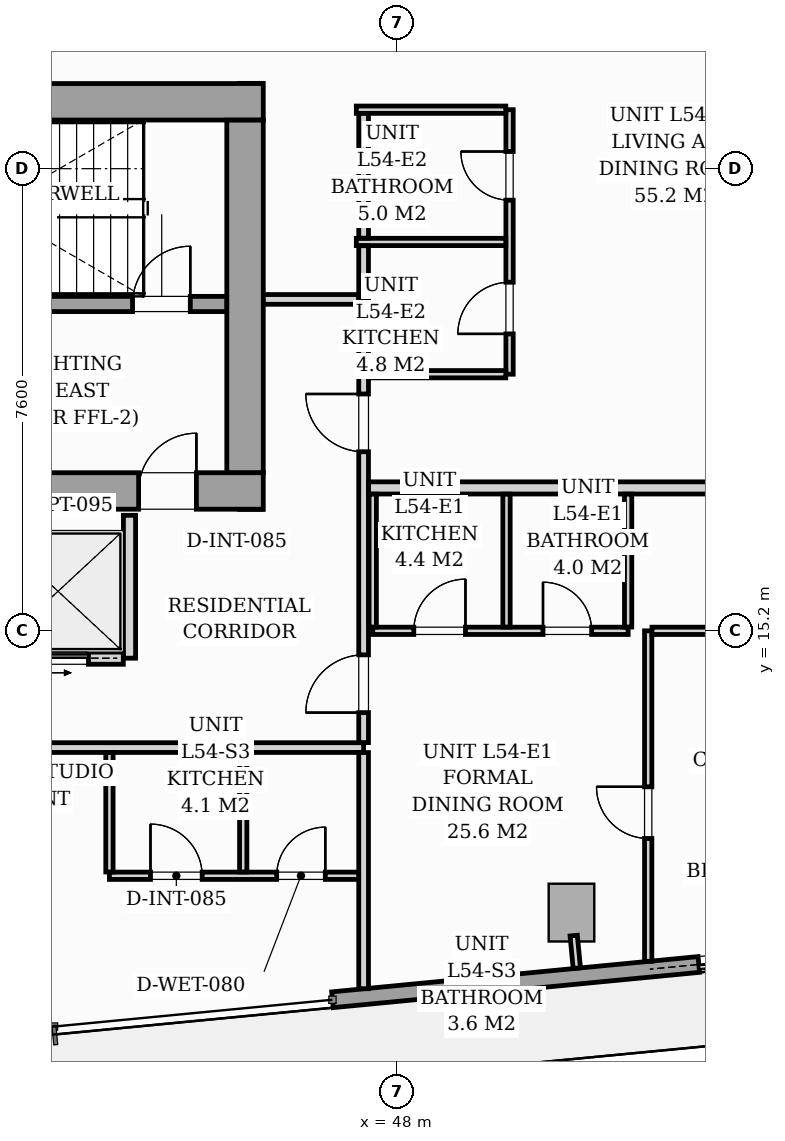
"""IFC4 building model, lengths in metres.
Left out: names, types, materials, properties, quantities, classifications, styles, units other than length and angle.
Written with IfcOpenShell. Run it as: python <this file> out.ifc"""

import sys

from ifc_helpers import new_model, si_unit, direction, frame, frame_2d, origin, origin_2d, place, context, subcontext, project, spatial, rectangle, i_section, extrude, source, transform, mapped, element, fill, save


model = new_model("IFC4")
c1 = context("Model", 3, precision=1e-05, world=origin(), true_north=direction((0.0, 1.0)))
c2 = subcontext(c1, "Body", "Model", "MODEL_VIEW")
j1 = project(units=[si_unit("LENGTHUNIT", "METRE"), si_unit("PLANEANGLEUNIT", "RADIAN")], contexts=[c1])
p1 = place(None, origin())
s1 = spatial("IfcSite", under=j1, at=p1, CompositionType="ELEMENT")
p2 = place(p1, origin())
s2 = spatial("IfcBuilding", under=s1, at=p2, CompositionType="ELEMENT")
p3 = place(p2, frame((0.0, 0.0, 189.0)))
s3 = spatial("IfcBuildingStorey", under=s2, at=p3, CompositionType="ELEMENT", Elevation=189.0)
m1 = source(origin(), c2, "Body", "SweptSolid", [
    extrude(i_section(OverallWidth=0.416, OverallDepth=0.446, WebThickness=0.039, FlangeThickness=0.063, FilletRadius=0.018, at=origin_2d()), origin(), (0.0, 0.0, 1.0), 3.196),
])
for number, where, z_axis, x_axis in (
    (1, (45.6, 17.4, 0.002), (0.0, 0.0, 1.0), (1.0, 0.0, 0.0)),
    (2, (45.6, 24.0, 0.002), (0.0, 0.0, 1.0), (1.0, 0.0, 0.0)),
):
    element("IfcColumn", number, at=place(p3, frame(where, z_axis=z_axis, x_axis=x_axis)), inside=s3, PredefinedType="PILASTER", context=c2, shape_type="MappedRepresentation", body=[
        mapped(m1, transform((0.0, 0.0, 0.0), scale=1.0)),
    ])
m2 = source(origin(), c2, "Body", "SweptSolid", [
    extrude(rectangle(XDim=0.75, YDim=0.95, at=origin_2d()), origin(), (0.0, 0.0, 1.0), 3.196),
])
p4 = place(p3, frame((50.868, 10.566, 0.002), z_axis=(0.0, 0.0, 1.0), x_axis=(0.995396198367, 0.09584575252, 0.0)))
e3 = element("IfcColumn", 3, at=p4, inside=s3, PredefinedType="COLUMN", context=c2, shape_type="MappedRepresentation", body=[
    mapped(m2, transform((0.0, 0.0, 0.0), scale=1.0)),
])
p5 = place(p3, frame((62.963, 10.676, 0.0), z_axis=(0.0, 0.0, 1.0), x_axis=(-0.995395627913, -0.095851676732, 0.0)))
e4 = element("IfcWall", 4, at=p5, inside=s3, PredefinedType="STANDARD", context=c2, shape_type="SweptSolid", body=[
    extrude(rectangle(XDim=16.1, YDim=0.26, at=frame_2d((8.05, 0.0))), origin(), (0.0, 0.0, 1.0), 2.94),
])
p6 = place(p5, frame((8.247, 0.0, 0.0)))
e5 = element("IfcOpeningElement", 5, at=p6, cuts=e4, PredefinedType="OPENING", context=c2, shape_type="SweptSolid", body=[
    extrude(rectangle(XDim=1.8, YDim=2.06, at=frame_2d((0.9, 1.03))), frame((0.0, 0.14, 0.0), z_axis=(0.0, -1.0, 0.0), x_axis=(1.0, 0.0, 0.0)), (0.0, 0.0, 1.0), 0.28),
])
p7 = place(p5, frame((2.05, 0.0, 0.65)))
e6 = element("IfcOpeningElement", 6, at=p7, cuts=e4, PredefinedType="OPENING", context=c2, shape_type="SweptSolid", body=[
    extrude(rectangle(XDim=1.6, YDim=1.5, at=frame_2d((0.8, 0.75))), frame((0.0, 0.14, 0.0), z_axis=(0.0, -1.0, 0.0), x_axis=(1.0, 0.0, 0.0)), (0.0, 0.0, 1.0), 0.28),
])
p8 = place(p3, frame((26.2, 17.5, 0.0), z_axis=(0.0, 0.0, 1.0), x_axis=(1.0, 0.0, 0.0)))
e7 = element("IfcWall", 7, at=p8, inside=s3, PredefinedType="SHEAR", context=c2, shape_type="SweptSolid", body=[
    extrude(rectangle(XDim=19.6, YDim=0.6, at=frame_2d((9.8, 0.0))), origin(), (0.0, 0.0, 1.0), 3.2),
])
p9 = place(p8, frame((0.95, 0.0, 0.0)))
e8 = element("IfcOpeningElement", 8, at=p9, cuts=e7, PredefinedType="OPENING", context=c2, shape_type="SweptSolid", body=[
    extrude(rectangle(XDim=0.95, YDim=2.06, at=frame_2d((0.475, 1.03))), frame((0.0, 0.31, 0.0), z_axis=(0.0, -1.0, 0.0), x_axis=(1.0, 0.0, 0.0)), (0.0, 0.0, 1.0), 0.62),
])
p10 = place(p8, frame((9.38, 0.0, 0.0)))
e9 = element("IfcOpeningElement", 9, at=p10, cuts=e7, PredefinedType="OPENING", context=c2, shape_type="SweptSolid", body=[
    extrude(rectangle(XDim=0.85, YDim=2.0, at=frame_2d((0.425, 1.0))), frame((0.0, 0.31, 0.0), z_axis=(0.0, -1.0, 0.0), x_axis=(1.0, 0.0, 0.0)), (0.0, 0.0, 1.0), 0.62),
])
p11 = place(p8, frame((17.55, 0.0, 0.0)))
e10 = element("IfcOpeningElement", 10, at=p11, cuts=e7, PredefinedType="OPENING", context=c2, shape_type="SweptSolid", body=[
    extrude(rectangle(XDim=0.95, YDim=2.06, at=frame_2d((0.475, 1.03))), frame((0.0, 0.31, 0.0), z_axis=(0.0, -1.0, 0.0), x_axis=(1.0, 0.0, 0.0)), (0.0, 0.0, 1.0), 0.62),
])
p12 = place(p3, frame((26.2, 23.9, 0.0), z_axis=(0.0, 0.0, 1.0), x_axis=(1.0, 0.0, 0.0)))
e11 = element("IfcWall", 11, at=p12, inside=s3, PredefinedType="SHEAR", context=c2, shape_type="SweptSolid", body=[
    extrude(rectangle(XDim=19.6, YDim=0.6, at=frame_2d((9.8, 0.0))), origin(), (0.0, 0.0, 1.0), 3.2),
])
p13 = place(p3, frame((45.5, 17.802, 0.0), z_axis=(0.0, 0.0, 1.0), x_axis=(0.0, 1.0, 0.0)))
e12 = element("IfcWall", 12, at=p13, inside=s3, PredefinedType="SHEAR", context=c2, shape_type="SweptSolid", body=[
    extrude(rectangle(XDim=5.796, YDim=0.6, at=frame_2d((2.898, 0.0))), origin(), (0.0, 0.0, 1.0), 3.2),
])
p14 = place(p3, frame((37.05, 20.575, 0.0), z_axis=(0.0, 0.0, 1.0), x_axis=(1.0, 0.0, 0.0)))
e13 = element("IfcWall", 13, at=p14, inside=s3, PredefinedType="SOLIDWALL", context=c2, shape_type="SweptSolid", body=[
    extrude(rectangle(XDim=8.148, YDim=0.25, at=frame_2d((4.074, 0.0))), origin(), (0.0, 0.0, 1.0), 3.2),
])
p15 = place(p14, frame((6.6, 0.0, 0.0)))
e14 = element("IfcOpeningElement", 14, at=p15, cuts=e13, PredefinedType="OPENING", context=c2, shape_type="SweptSolid", body=[
    extrude(rectangle(XDim=0.95, YDim=2.06, at=frame_2d((0.475, 1.03))), frame((0.0, 0.135, 0.0), z_axis=(0.0, -1.0, 0.0), x_axis=(1.0, 0.0, 0.0)), (0.0, 0.0, 1.0), 0.27),
])
p16 = place(p3, frame((43.6, 14.75, 0.0), z_axis=(0.0, 0.0, 1.0), x_axis=(0.0, 1.0, 0.0)))
e15 = element("IfcWall", 15, at=p16, inside=s3, PredefinedType="PARTITIONING", context=c2, shape_type="SweptSolid", body=[
    extrude(rectangle(XDim=2.35, YDim=0.2, at=frame_2d((1.175, 0.0))), origin(), (0.0, 0.0, 1.0), 2.94),
])
p17 = place(p3, frame((41.352, 14.75, 0.0), z_axis=(0.0, 0.0, 1.0), x_axis=(1.0, 0.0, 0.0)))
e16 = element("IfcWall", 16, at=p17, inside=s3, PredefinedType="PARTITIONING", context=c2, shape_type="SweptSolid", body=[
    extrude(rectangle(XDim=2.146, YDim=0.2, at=frame_2d((1.073, 0.0))), origin(), (0.0, 0.0, 1.0), 2.94),
])
p18 = place(p17, frame((0.523, 0.0, 0.0)))
e17 = element("IfcOpeningElement", 17, at=p18, cuts=e16, PredefinedType="OPENING", context=c2, shape_type="SweptSolid", body=[
    extrude(rectangle(XDim=1.05, YDim=2.08, at=frame_2d((0.525, 1.04))), frame((0.0, 0.11, 0.0), z_axis=(0.0, -1.0, 0.0), x_axis=(1.0, 0.0, 0.0)), (0.0, 0.0, 1.0), 0.22),
])
p19 = place(p3, frame((26.12, 13.28, 0.0), z_axis=(0.0, 0.0, 1.0), x_axis=(1.0, 0.0, 0.0)))
e18 = element("IfcWall", 18, at=p19, inside=s3, PredefinedType="PARTITIONING", context=c2, shape_type="SweptSolid", body=[
    extrude(rectangle(XDim=21.33, YDim=0.16, at=frame_2d((10.665, 0.0))), origin(), (0.0, 0.0, 1.0), 2.94),
])
p20 = place(p19, frame((4.704, 0.0, 0.0)))
e19 = element("IfcOpeningElement", 19, at=p20, cuts=e18, PredefinedType="OPENING", context=c2, shape_type="SweptSolid", body=[
    extrude(rectangle(XDim=0.95, YDim=2.06, at=frame_2d((0.475, 1.03))), frame((0.0, 0.09, 0.0), z_axis=(0.0, -1.0, 0.0), x_axis=(1.0, 0.0, 0.0)), (0.0, 0.0, 1.0), 0.18),
])
p21 = place(p19, frame((11.6, 0.0, 0.0)))
e20 = element("IfcOpeningElement", 20, at=p21, cuts=e18, PredefinedType="OPENING", context=c2, shape_type="SweptSolid", body=[
    extrude(rectangle(XDim=0.95, YDim=2.06, at=frame_2d((0.475, 1.03))), frame((0.0, 0.09, 0.0), z_axis=(0.0, -1.0, 0.0), x_axis=(1.0, 0.0, 0.0)), (0.0, 0.0, 1.0), 0.18),
])
p22 = place(p19, frame((14.976, 0.0, 0.0)))
e21 = element("IfcOpeningElement", 21, at=p22, cuts=e18, PredefinedType="OPENING", context=c2, shape_type="SweptSolid", body=[
    extrude(rectangle(XDim=0.95, YDim=2.06, at=frame_2d((0.475, 1.03))), frame((0.0, 0.09, 0.0), z_axis=(0.0, -1.0, 0.0), x_axis=(1.0, 0.0, 0.0)), (0.0, 0.0, 1.0), 0.18),
])
p23 = place(p3, frame((47.45, 9.315, 0.0), z_axis=(0.0, 0.0, 1.0), x_axis=(0.0, 1.0, 0.0)))
e22 = element("IfcWall", 22, at=p23, inside=s3, PredefinedType="PARTITIONING", context=c2, shape_type="SweptSolid", body=[
    extrude(rectangle(XDim=3.883, YDim=0.16, at=frame_2d((1.941, 0.0))), origin(), (0.0, 0.0, 1.0), 2.94),
])
p24 = place(p3, frame((47.45, 13.362, 0.0), z_axis=(0.0, 0.0, 1.0), x_axis=(0.0, 1.0, 0.0)))
e23 = element("IfcWall", 23, at=p24, inside=s3, PredefinedType="PARTITIONING", context=c2, shape_type="SweptSolid", body=[
    extrude(rectangle(XDim=7.288, YDim=0.16, at=frame_2d((3.644, 0.0))), origin(), (0.0, 0.0, 1.0), 2.94),
])
p25 = place(p24, frame((0.493, 0.0, 0.0)))
e24 = element("IfcOpeningElement", 24, at=p25, cuts=e23, PredefinedType="OPENING", context=c2, shape_type="SweptSolid", body=[
    extrude(rectangle(XDim=0.95, YDim=2.06, at=frame_2d((0.475, 1.03))), frame((0.0, 0.09, 0.0), z_axis=(0.0, -1.0, 0.0), x_axis=(1.0, 0.0, 0.0)), (0.0, 0.0, 1.0), 0.18),
])
p26 = place(p24, frame((4.783, 0.0, 0.0)))
e25 = element("IfcOpeningElement", 25, at=p26, cuts=e23, PredefinedType="OPENING", context=c2, shape_type="SweptSolid", body=[
    extrude(rectangle(XDim=0.95, YDim=2.06, at=frame_2d((0.475, 1.03))), frame((0.0, 0.09, 0.0), z_axis=(0.0, -1.0, 0.0), x_axis=(1.0, 0.0, 0.0)), (0.0, 0.0, 1.0), 0.18),
])
p27 = place(p3, frame((45.802, 20.65, 0.0), z_axis=(0.0, 0.0, 1.0), x_axis=(1.0, 0.0, 0.0)))
e26 = element("IfcWall", 26, at=p27, inside=s3, PredefinedType="PARTITIONING", context=c2, shape_type="SweptSolid", body=[
    extrude(rectangle(XDim=1.566, YDim=0.16, at=frame_2d((0.783, 0.0))), origin(), (0.0, 0.0, 1.0), 2.94),
])
p28 = place(p3, frame((43.27, 11.172, 0.0), z_axis=(0.0, 0.0, 1.0), x_axis=(1.0, 0.0, 0.0)))
e27 = element("IfcWall", 27, at=p28, inside=s3, PredefinedType="PARTITIONING", context=c2, shape_type="SweptSolid", body=[
    extrude(rectangle(XDim=4.098, YDim=0.12, at=frame_2d((2.049, 0.0))), origin(), (0.0, 0.0, 1.0), 2.94),
])
p29 = place(p28, frame((0.675, 0.0, 0.0)))
e28 = element("IfcOpeningElement", 28, at=p29, cuts=e27, PredefinedType="OPENING", context=c2, shape_type="SweptSolid", body=[
    extrude(rectangle(XDim=0.85, YDim=2.05, at=frame_2d((0.425, 1.025))), frame((0.0, 0.07, 0.0), z_axis=(0.0, -1.0, 0.0), x_axis=(1.0, 0.0, 0.0)), (0.0, 0.0, 1.0), 0.14),
])
p30 = place(p28, frame((2.75, 0.0, 0.0)))
e29 = element("IfcOpeningElement", 29, at=p30, cuts=e27, PredefinedType="OPENING", context=c2, shape_type="SweptSolid", body=[
    extrude(rectangle(XDim=0.8, YDim=2.02, at=frame_2d((0.4, 1.01))), frame((0.0, 0.07, 0.0), z_axis=(0.0, -1.0, 0.0), x_axis=(1.0, 0.0, 0.0)), (0.0, 0.0, 1.0), 0.14),
])
for number, where, z_axis, x_axis in (
    (30, (43.27, 11.234, 0.0), (0.0, 0.0, 1.0), (0.0, 1.0, 0.0)),
    (31, (45.47, 11.234, 0.0), (0.0, 0.0, 1.0), (0.0, 1.0, 0.0)),
):
    element("IfcWall", number, at=place(p3, frame(where, z_axis=z_axis, x_axis=x_axis)), inside=s3, PredefinedType="PARTITIONING", context=c2, shape_type="SweptSolid", body=[
        extrude(rectangle(XDim=1.964, YDim=0.12, at=frame_2d((0.982, 0.0))), origin(), (0.0, 0.0, 1.0), 2.94),
    ])
p31 = place(p3, frame((47.532, 17.55, 0.0), z_axis=(0.0, 0.0, 1.0), x_axis=(1.0, 0.0, 0.0)))
e32 = element("IfcWall", 32, at=p31, inside=s3, PredefinedType="PARTITIONING", context=c2, shape_type="SweptSolid", body=[
    extrude(rectangle(XDim=17.201, YDim=0.2, at=frame_2d((8.601, 0.0))), origin(), (0.0, 0.0, 1.0), 2.281),
])
p32 = place(p3, frame((47.6, 15.2, 0.0), z_axis=(0.0, 0.0, 1.0), x_axis=(1.0, 0.0, 0.0)))
e33 = element("IfcWall", 33, at=p32, inside=s3, PredefinedType="PARTITIONING", context=c2, shape_type="SweptSolid", body=[
    extrude(rectangle(XDim=4.2, YDim=0.12, at=frame_2d((2.1, 0.0))), origin(), (0.0, 0.0, 1.0), 2.94),
])
p33 = place(p32, frame((0.675, 0.0, 0.0)))
e34 = element("IfcOpeningElement", 34, at=p33, cuts=e33, PredefinedType="OPENING", context=c2, shape_type="SweptSolid", body=[
    extrude(rectangle(XDim=0.85, YDim=2.05, at=frame_2d((0.425, 1.025))), frame((0.0, 0.07, 0.0), z_axis=(0.0, -1.0, 0.0), x_axis=(1.0, 0.0, 0.0)), (0.0, 0.0, 1.0), 0.14),
])
p34 = place(p32, frame((2.8, 0.0, 0.0)))
e35 = element("IfcOpeningElement", 35, at=p34, cuts=e33, PredefinedType="OPENING", context=c2, shape_type="SweptSolid", body=[
    extrude(rectangle(XDim=0.8, YDim=2.02, at=frame_2d((0.4, 1.01))), frame((0.0, 0.07, 0.0), z_axis=(0.0, -1.0, 0.0), x_axis=(1.0, 0.0, 0.0)), (0.0, 0.0, 1.0), 0.14),
])
for number, where, z_axis, x_axis in (
    (36, (47.6, 15.262, 0.0), (0.0, 0.0, 1.0), (0.0, 1.0, 0.0)),
    (37, (49.8, 15.262, 0.0), (0.0, 0.0, 1.0), (0.0, 1.0, 0.0)),
    (38, (51.8, 15.262, 0.0), (0.0, 0.0, 1.0), (0.0, 1.0, 0.0)),
):
    element("IfcWall", number, at=place(p3, frame(where, z_axis=z_axis, x_axis=x_axis)), inside=s3, PredefinedType="PARTITIONING", context=c2, shape_type="SweptSolid", body=[
        extrude(rectangle(XDim=2.186, YDim=0.12, at=frame_2d((1.093, 0.0))), origin(), (0.0, 0.0, 1.0), 2.94),
    ])
p35 = place(p3, frame((52.13, 9.766, 0.0), z_axis=(0.0, 0.0, 1.0), x_axis=(0.0, 1.0, 0.0)))
e39 = element("IfcWall", 39, at=p35, inside=s3, PredefinedType="PARTITIONING", context=c2, shape_type="SweptSolid", body=[
    extrude(rectangle(XDim=5.434, YDim=0.12, at=frame_2d((2.717, 0.0))), origin(), (0.0, 0.0, 1.0), 2.94),
])
p36 = place(p35, frame((2.019, 0.0, 0.0)))
e40 = element("IfcOpeningElement", 40, at=p36, cuts=e39, PredefinedType="OPENING", context=c2, shape_type="SweptSolid", body=[
    extrude(rectangle(XDim=0.85, YDim=2.05, at=frame_2d((0.425, 1.025))), frame((0.0, 0.07, 0.0), z_axis=(0.0, -1.0, 0.0), x_axis=(1.0, 0.0, 0.0)), (0.0, 0.0, 1.0), 0.14),
])
p37 = place(p3, frame((52.192, 15.2, 0.0), z_axis=(0.0, 0.0, 1.0), x_axis=(1.0, 0.0, 0.0)))
e41 = element("IfcWall", 41, at=p37, inside=s3, PredefinedType="PARTITIONING", context=c2, shape_type="SweptSolid", body=[
    extrude(rectangle(XDim=4.206, YDim=0.12, at=frame_2d((2.103, 0.0))), origin(), (0.0, 0.0, 1.0), 2.94),
])
p38 = place(p3, frame((49.85, 19.42, 0.0), z_axis=(0.0, 0.0, 1.0), x_axis=(0.0, 1.0, 0.0)))
e42 = element("IfcWall", 42, at=p38, inside=s3, PredefinedType="PARTITIONING", context=c2, shape_type="SweptSolid", body=[
    extrude(rectangle(XDim=4.35, YDim=0.12, at=frame_2d((2.175, 0.0))), origin(), (0.0, 0.0, 1.0), 2.94),
])
p39 = place(p38, frame((0.663, 0.0, 0.0)))
e43 = element("IfcOpeningElement", 43, at=p39, cuts=e42, PredefinedType="OPENING", context=c2, shape_type="SweptSolid", body=[
    extrude(rectangle(XDim=0.85, YDim=2.05, at=frame_2d((0.425, 1.025))), frame((0.0, 0.07, 0.0), z_axis=(0.0, -1.0, 0.0), x_axis=(1.0, 0.0, 0.0)), (0.0, 0.0, 1.0), 0.14),
])
p40 = place(p38, frame((2.862, 0.0, 0.0)))
e44 = element("IfcOpeningElement", 44, at=p40, cuts=e42, PredefinedType="OPENING", context=c2, shape_type="SweptSolid", body=[
    extrude(rectangle(XDim=0.8, YDim=2.02, at=frame_2d((0.4, 1.01))), frame((0.0, 0.07, 0.0), z_axis=(0.0, -1.0, 0.0), x_axis=(1.0, 0.0, 0.0)), (0.0, 0.0, 1.0), 0.14),
])
p41 = place(p3, frame((47.33, 21.595, 0.0), z_axis=(0.0, 0.0, 1.0), x_axis=(1.0, 0.0, 0.0)))
e45 = element("IfcWall", 45, at=p41, inside=s3, PredefinedType="PARTITIONING", context=c2, shape_type="SweptSolid", body=[
    extrude(rectangle(XDim=2.458, YDim=0.12, at=frame_2d((1.229, 0.0))), origin(), (0.0, 0.0, 1.0), 2.94),
])
p42 = place(p3, frame((47.532, 19.42, 0.0), z_axis=(0.0, 0.0, 1.0), x_axis=(1.0, 0.0, 0.0)))
e46 = element("IfcWall", 46, at=p42, inside=s3, PredefinedType="PARTITIONING", context=c2, shape_type="SweptSolid", body=[
    extrude(rectangle(XDim=2.256, YDim=0.12, at=frame_2d((1.128, 0.0))), origin(), (0.0, 0.0, 1.0), 2.94),
])
p43 = place(p3, frame((47.33, 23.77, 0.0), z_axis=(0.0, 0.0, 1.0), x_axis=(1.0, 0.0, 0.0)))
e47 = element("IfcWall", 47, at=p43, inside=s3, PredefinedType="PARTITIONING", context=c2, shape_type="SweptSolid", body=[
    extrude(rectangle(XDim=2.458, YDim=0.12, at=frame_2d((1.229, 0.0))), origin(), (0.0, 0.0, 1.0), 2.94),
])
p44 = place(p3, frame((47.45, 20.65, 0.0), z_axis=(0.0, 0.0, 1.0), x_axis=(0.0, 1.0, 0.0)))
e48 = element("IfcWall", 48, at=p44, inside=s3, PredefinedType="PARTITIONING", context=c2, shape_type="SweptSolid", body=[
    extrude(rectangle(XDim=0.883, YDim=0.16, at=frame_2d((0.441, 0.0))), origin(), (0.0, 0.0, 1.0), 2.94),
])
p45 = place(p3, frame((47.45, 21.657, 0.0), z_axis=(0.0, 0.0, 1.0), x_axis=(0.0, 1.0, 0.0)))
e49 = element("IfcWall", 49, at=p45, inside=s3, PredefinedType="PARTITIONING", context=c2, shape_type="SweptSolid", body=[
    extrude(rectangle(XDim=2.051, YDim=0.16, at=frame_2d((1.025, 0.0))), origin(), (0.0, 0.0, 1.0), 2.94),
])
p46 = place(p3, frame((50.905, 10.188, 0.0), z_axis=(0.0, 0.0, 1.0), x_axis=(0.095772948675, -0.995403205893, 0.0)))
e50 = element("IfcWall", 50, at=p46, inside=s3, PredefinedType="PARTITIONING", context=c2, shape_type="SweptSolid", body=[
    extrude(rectangle(XDim=0.538, YDim=0.12, at=frame_2d((0.269, 0.0))), origin(), (0.0, 0.0, 1.0), 2.94),
])
m3 = source(origin(), c2, "Body", "SweptSolid", [
    extrude(rectangle(XDim=1.8, YDim=2.06, at=frame_2d((0.9, 1.03))), frame((0.0, 0.025, 0.0), z_axis=(0.0, -1.0, 0.0), x_axis=(1.0, 0.0, 0.0)), (0.0, 0.0, 1.0), 0.05),
])
p47 = place(p6, origin())
e51 = element("IfcDoor", 51, at=p47, inside=s3, OperationType="SLIDING_TO_RIGHT", PredefinedType="DOOR", context=c2, shape_type="MappedRepresentation", body=[
    mapped(m3, transform((0.0, 0.0, 0.0), scale=1.0)),
])
fill(e5, e51)
m4 = source(origin(), c2, "Body", "SweptSolid", [
    extrude(rectangle(XDim=0.95, YDim=2.06, at=frame_2d((0.475, 1.03))), frame((0.0, 0.025, 0.0), z_axis=(0.0, -1.0, 0.0), x_axis=(1.0, 0.0, 0.0)), (0.0, 0.0, 1.0), 0.05),
])
p48 = place(p11, origin())
e52 = element("IfcDoor", 52, at=p48, inside=s3, OperationType="SINGLE_SWING_RIGHT", PredefinedType="DOOR", context=c2, shape_type="MappedRepresentation", body=[
    mapped(m4, transform((0.0, 0.0, 0.0), scale=1.0)),
])
fill(e10, e52)
p49 = place(p15, origin())
e53 = element("IfcDoor", 53, at=p49, inside=s3, OperationType="SINGLE_SWING_RIGHT", PredefinedType="DOOR", context=c2, shape_type="MappedRepresentation", body=[
    mapped(m4, transform((0.0, 0.0, 0.0), scale=1.0)),
])
fill(e14, e53)
m5 = source(origin(), c2, "Body", "SweptSolid", [
    extrude(rectangle(XDim=1.05, YDim=2.08, at=frame_2d((0.525, 1.04))), frame((0.0, 0.025, 0.0), z_axis=(0.0, -1.0, 0.0), x_axis=(1.0, 0.0, 0.0)), (0.0, 0.0, 1.0), 0.05),
])
p50 = place(p18, origin())
e54 = element("IfcDoor", 54, at=p50, inside=s3, OperationType="SLIDING_TO_RIGHT", PredefinedType="DOOR", context=c2, shape_type="MappedRepresentation", body=[
    mapped(m5, transform((0.0, 0.0, 0.0), scale=1.0)),
])
fill(e17, e54)
m6 = source(origin(), c2, "Body", "SweptSolid", [
    extrude(rectangle(XDim=0.85, YDim=2.05, at=frame_2d((0.425, 1.025))), frame((0.0, 0.025, 0.0), z_axis=(0.0, -1.0, 0.0), x_axis=(1.0, 0.0, 0.0)), (0.0, 0.0, 1.0), 0.05),
])
p51 = place(p29, origin())
e55 = element("IfcDoor", 55, at=p51, inside=s3, OperationType="SINGLE_SWING_LEFT", PredefinedType="DOOR", context=c2, shape_type="MappedRepresentation", body=[
    mapped(m6, transform((0.0, 0.0, 0.0), scale=1.0)),
])
fill(e28, e55)
m7 = source(origin(), c2, "Body", "SweptSolid", [
    extrude(rectangle(XDim=0.8, YDim=2.02, at=frame_2d((0.4, 1.01))), frame((0.0, 0.025, 0.0), z_axis=(0.0, -1.0, 0.0), x_axis=(1.0, 0.0, 0.0)), (0.0, 0.0, 1.0), 0.05),
])
p52 = place(p30, origin())
e56 = element("IfcDoor", 56, at=p52, inside=s3, OperationType="SINGLE_SWING_RIGHT", PredefinedType="DOOR", context=c2, shape_type="MappedRepresentation", body=[
    mapped(m7, transform((0.0, 0.0, 0.0), scale=1.0)),
])
fill(e29, e56)
m8 = source(origin(), c2, "Body", "SweptSolid", [
    extrude(rectangle(XDim=0.95, YDim=2.06, at=frame_2d((0.475, 1.03))), frame((0.0, 0.025, 0.0), z_axis=(0.0, -1.0, 0.0), x_axis=(1.0, 0.0, 0.0)), (0.0, 0.0, 1.0), 0.05),
])
p53 = place(p25, origin())
e57 = element("IfcDoor", 57, at=p53, inside=s3, OperationType="SINGLE_SWING_LEFT", PredefinedType="DOOR", context=c2, shape_type="MappedRepresentation", body=[
    mapped(m8, transform((0.0, 0.0, 0.0), scale=1.0)),
])
fill(e24, e57)
p54 = place(p36, origin())
e58 = element("IfcDoor", 58, at=p54, inside=s3, OperationType="SINGLE_SWING_RIGHT", PredefinedType="DOOR", context=c2, shape_type="MappedRepresentation", body=[
    mapped(m6, transform((0.0, 0.0, 0.0), scale=1.0)),
])
fill(e40, e58)
p55 = place(p33, origin())
e59 = element("IfcDoor", 59, at=p55, inside=s3, OperationType="SINGLE_SWING_RIGHT", PredefinedType="DOOR", context=c2, shape_type="MappedRepresentation", body=[
    mapped(m6, transform((0.0, 0.0, 0.0), scale=1.0)),
])
fill(e34, e59)
p56 = place(p34, origin())
e60 = element("IfcDoor", 60, at=p56, inside=s3, OperationType="SINGLE_SWING_LEFT", PredefinedType="DOOR", context=c2, shape_type="MappedRepresentation", body=[
    mapped(m7, transform((0.0, 0.0, 0.0), scale=1.0)),
])
fill(e35, e60)
p57 = place(p26, origin())
e61 = element("IfcDoor", 61, at=p57, inside=s3, OperationType="SINGLE_SWING_RIGHT", PredefinedType="DOOR", context=c2, shape_type="MappedRepresentation", body=[
    mapped(m8, transform((0.0, 0.0, 0.0), scale=1.0)),
])
fill(e25, e61)
p58 = place(p39, origin())
e62 = element("IfcDoor", 62, at=p58, inside=s3, OperationType="SINGLE_SWING_LEFT", PredefinedType="DOOR", context=c2, shape_type="MappedRepresentation", body=[
    mapped(m6, transform((0.0, 0.0, 0.0), scale=1.0)),
])
fill(e43, e62)
p59 = place(p40, origin())
e63 = element("IfcDoor", 63, at=p59, inside=s3, OperationType="SINGLE_SWING_RIGHT", PredefinedType="DOOR", context=c2, shape_type="MappedRepresentation", body=[
    mapped(m7, transform((0.0, 0.0, 0.0), scale=1.0)),
])
fill(e44, e63)
save(model, sys.argv[1])
